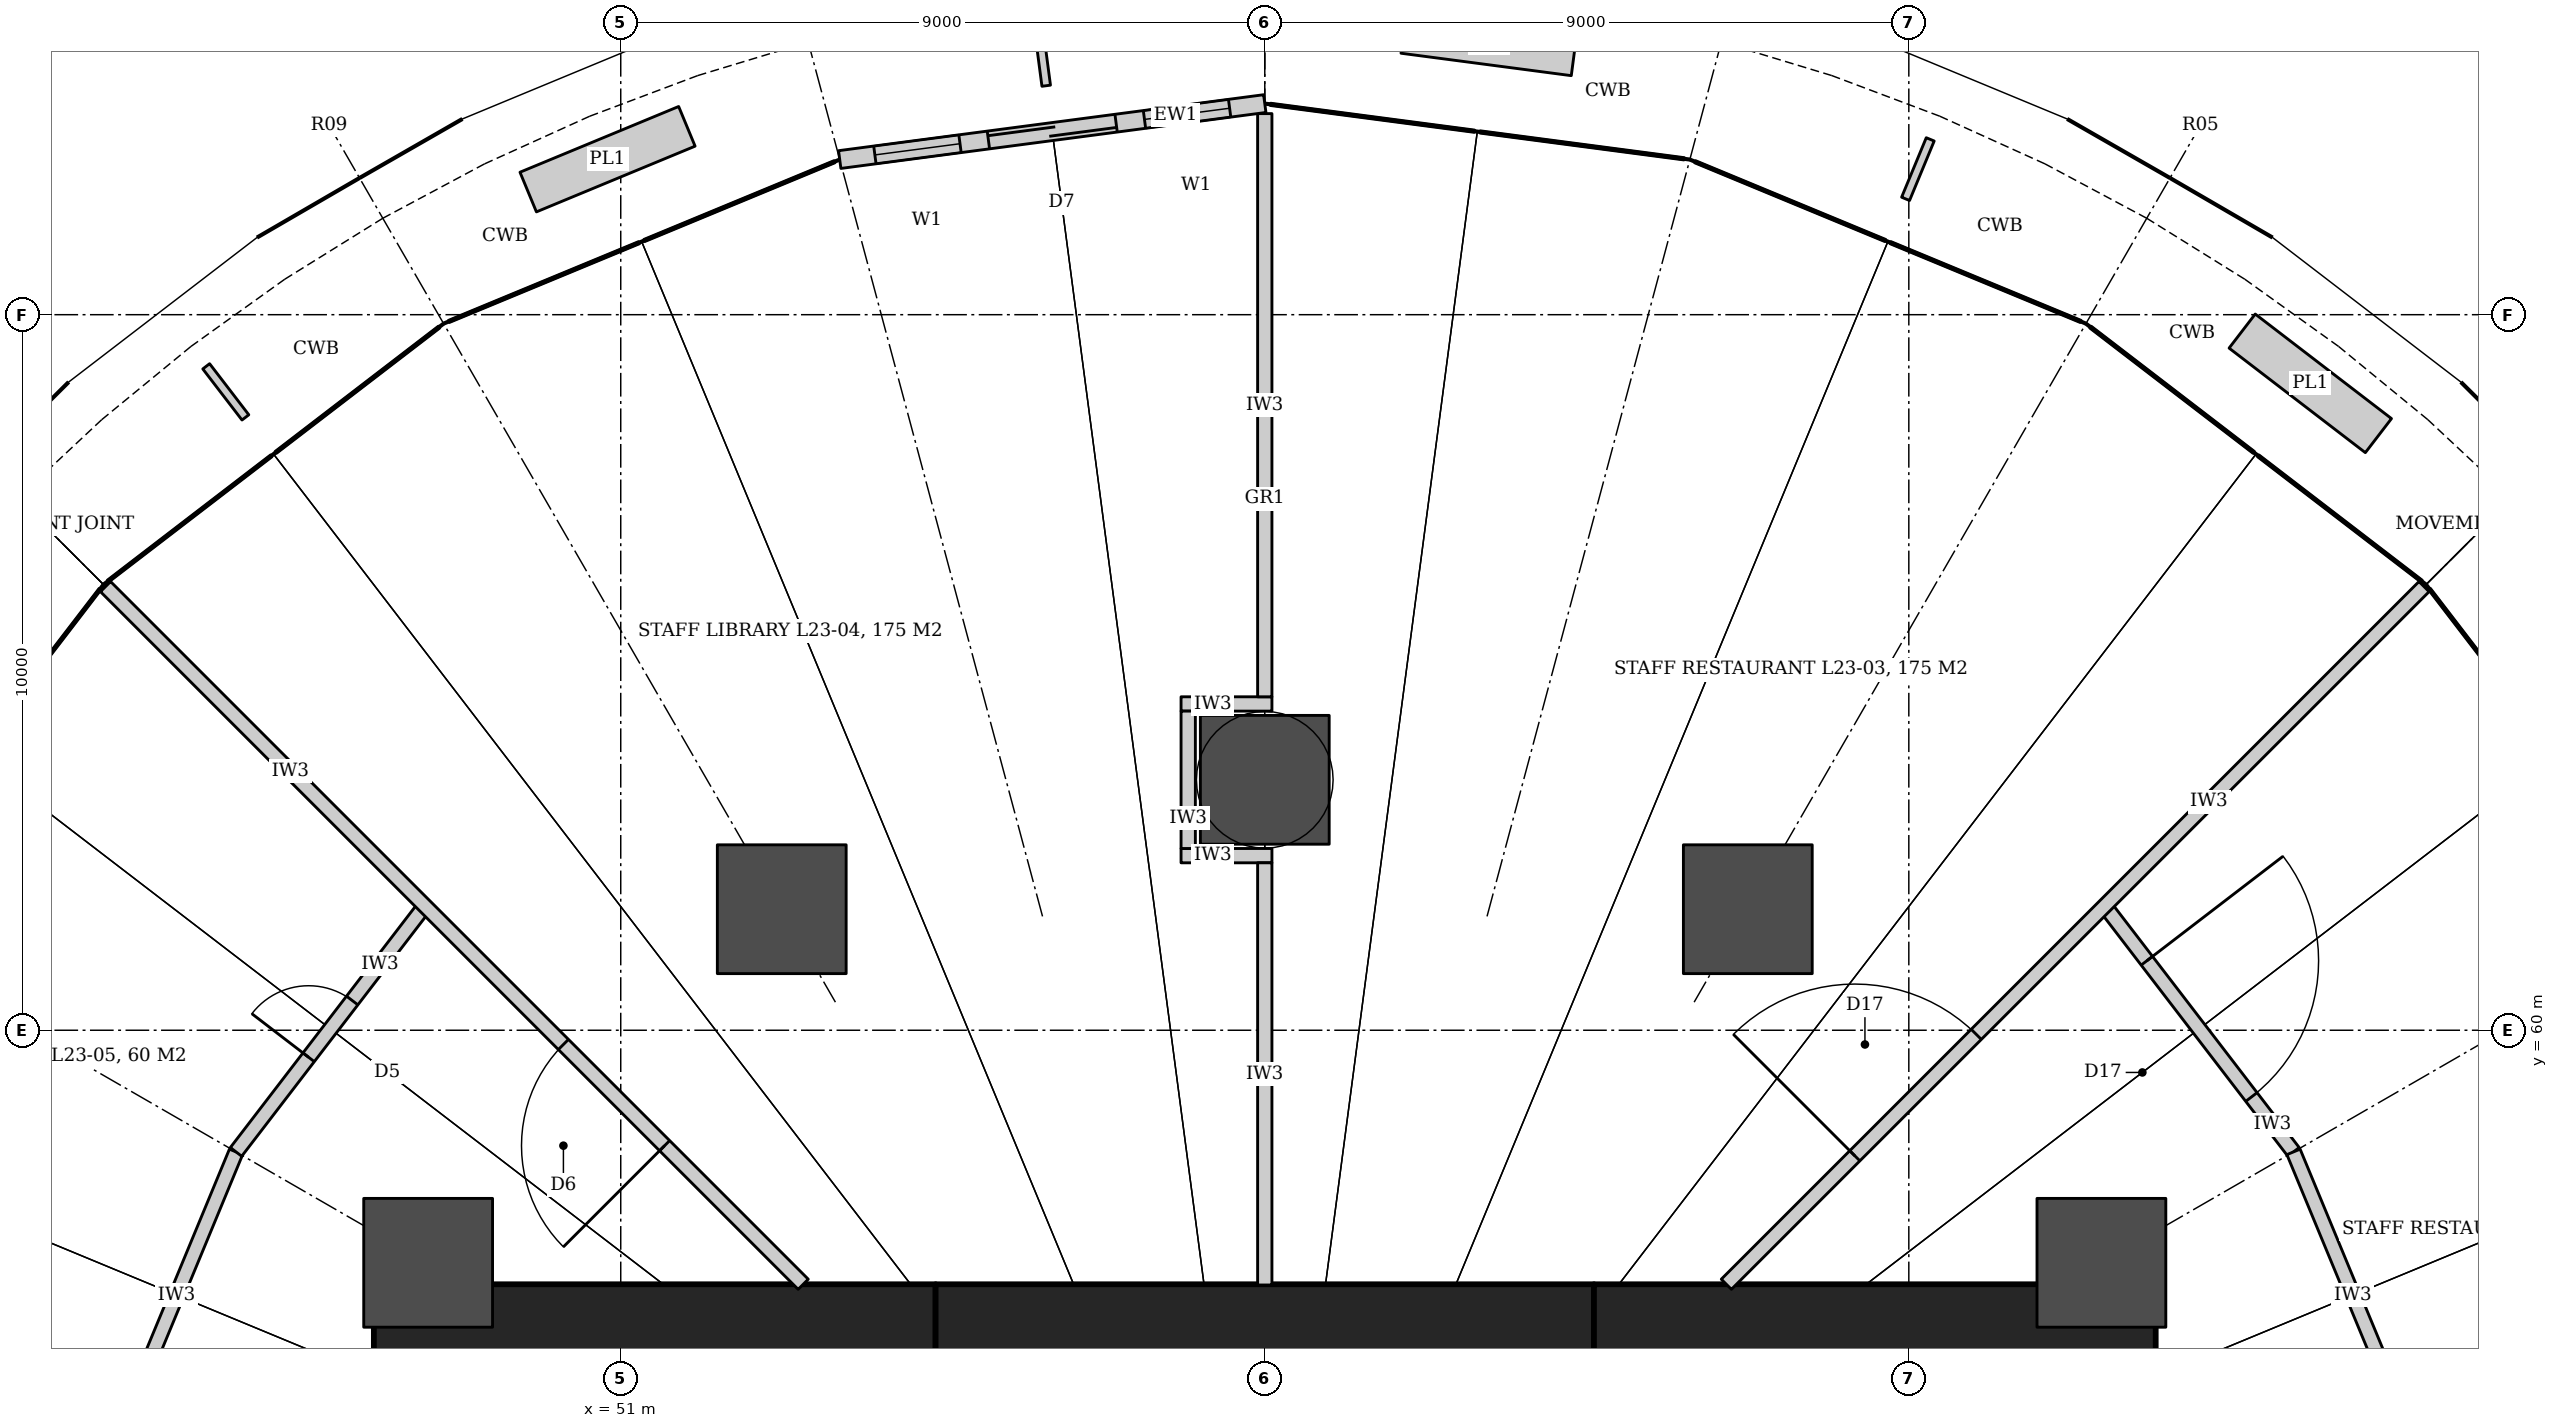
"""IFC4 building model, lengths in metres.
Left out: names, types, materials, properties, quantities, classifications, styles, units other than length and angle.
Written with IfcOpenShell. Run it as: python <this file> out.ifc"""

import sys

from ifc_helpers import new_model, si_unit, direction, frame, frame_2d, origin, origin_2d, place, context, subcontext, project, spatial, rectangle, hollow_circle, extrude, element, fill, save


model = new_model("IFC4")
c1 = context("Model", 3, precision=1e-05, world=origin(), true_north=direction((0.0, 1.0)))
c2 = subcontext(c1, "Body", "Model", "MODEL_VIEW")
j1 = project(units=[si_unit("LENGTHUNIT", "METRE"), si_unit("PLANEANGLEUNIT", "RADIAN")], contexts=[c1])
p1 = place(None, origin())
s1 = spatial("IfcSite", under=j1, at=p1, CompositionType="ELEMENT")
p2 = place(p1, origin())
s2 = spatial("IfcBuilding", under=s1, at=p2, CompositionType="ELEMENT")
p3 = place(p2, frame((0.0, 0.0, 105.8)))
s3 = spatial("IfcBuildingStorey", under=s2, at=p3, CompositionType="ELEMENT", Elevation=105.8)
p4 = place(p3, frame((47.55, 55.55, 0.0), z_axis=(0.0, 0.0, 1.0), x_axis=(1.0, 0.0, 0.0)))
e1 = element("IfcWall", 1, at=p4, inside=s3, PredefinedType="SHEAR", context=c2, shape_type="SweptSolid", body=[
    extrude(rectangle(XDim=7.85, YDim=1.8, at=frame_2d((3.925, 0.0))), origin(), (0.0, 0.0, 1.0), 4.2),
])
p5 = place(p3, frame((55.4, 55.55, 0.0), z_axis=(0.0, 0.0, 1.0), x_axis=(1.0, 0.0, 0.0)))
e2 = element("IfcWall", 2, at=p5, inside=s3, PredefinedType="SHEAR", context=c2, shape_type="SweptSolid", body=[
    extrude(rectangle(XDim=9.2, YDim=1.8, at=frame_2d((4.6, 0.0))), origin(), (0.0, 0.0, 1.0), 4.2),
])
p6 = place(p3, frame((64.6, 55.55, 0.0), z_axis=(0.0, 0.0, 1.0), x_axis=(1.0, 0.0, 0.0)))
e3 = element("IfcWall", 3, at=p6, inside=s3, PredefinedType="SHEAR", context=c2, shape_type="SweptSolid", body=[
    extrude(rectangle(XDim=7.85, YDim=1.8, at=frame_2d((3.925, 0.0))), origin(), (0.0, 0.0, 1.0), 4.2),
])
for number, where, z_axis, x_axis in (
    (4, (71.691, 56.75, 0.0), (0.0, 0.0, 1.0), (1.0, 0.0, 0.0)),
    (5, (66.75, 61.691, 0.0), (0.0, 0.0, 1.0), (1.0, 0.0, 0.0)),
    (6, (60.0, 63.5, 0.0), (0.0, 0.0, 1.0), (1.0, 0.0, 0.0)),
    (7, (53.25, 61.691, 0.0), (0.0, 0.0, 1.0), (1.0, 0.0, 0.0)),
    (8, (48.309, 56.75, 0.0), (0.0, 0.0, 1.0), (1.0, 0.0, 0.0)),
):
    element("IfcColumn", number, at=place(p3, frame(where, z_axis=z_axis, x_axis=x_axis)), inside=s3, PredefinedType="COLUMN", context=c2, shape_type="SweptSolid", body=[
        extrude(hollow_circle(Radius=0.9, WallThickness=0.09, at=origin_2d()), origin(), (0.0, 0.0, 1.0), 4.2),
    ])
p7 = place(p3, frame((43.966, 54.296, 0.0), z_axis=(0.0, 0.0, 1.0), x_axis=(0.382698425325, 0.923873322082, 0.0)))
e9 = element("IfcWall", 9, at=p7, inside=s3, PredefinedType="PARTITIONING", context=c2, shape_type="SweptSolid", body=[
    extrude(rectangle(XDim=4.333, YDim=0.2, at=frame_2d((2.167, 0.0))), origin(), (0.0, 0.0, 1.0), 3.04),
])
p8 = place(p3, frame((45.624, 58.3, 0.0), z_axis=(0.0, 0.0, 1.0), x_axis=(0.60874374674, 0.79336690806, 0.0)))
e10 = element("IfcWall", 10, at=p8, inside=s3, PredefinedType="PARTITIONING", context=c2, shape_type="SweptSolid", body=[
    extrude(rectangle(XDim=4.333, YDim=0.2, at=frame_2d((2.167, 0.0))), origin(), (0.0, 0.0, 1.0), 3.04),
])
p9 = place(p8, frame((1.667, 0.0, 0.0)))
e11 = element("IfcOpeningElement", 11, at=p9, cuts=e10, PredefinedType="OPENING", context=c2, shape_type="SweptSolid", body=[
    extrude(rectangle(XDim=1.0, YDim=2.1, at=frame_2d((0.5, 1.05))), frame((0.0, 0.11, 0.0), z_axis=(0.0, -1.0, 0.0), x_axis=(1.0, 0.0, 0.0)), (0.0, 0.0, 1.0), 0.22),
])
p10 = place(p3, frame((71.738, 61.738, 0.0), z_axis=(0.0, 0.0, 1.0), x_axis=(0.60874374674, -0.79336690806, 0.0)))
e12 = element("IfcWall", 12, at=p10, inside=s3, PredefinedType="PARTITIONING", context=c2, shape_type="SweptSolid", body=[
    extrude(rectangle(XDim=4.333, YDim=0.2, at=frame_2d((2.167, 0.0))), origin(), (0.0, 0.0, 1.0), 3.04),
])
p11 = place(p10, frame((0.967, 0.0, 0.0)))
e13 = element("IfcOpeningElement", 13, at=p11, cuts=e12, PredefinedType="OPENING", context=c2, shape_type="SweptSolid", body=[
    extrude(rectangle(XDim=2.4, YDim=2.4, at=frame_2d((1.2, 1.2))), frame((0.0, 0.11, 0.0), z_axis=(0.0, -1.0, 0.0), x_axis=(1.0, 0.0, 0.0)), (0.0, 0.0, 1.0), 0.22),
])
p12 = place(p3, frame((74.376, 58.3, 0.0), z_axis=(0.0, 0.0, 1.0), x_axis=(0.382698425325, -0.923873322082, 0.0)))
e14 = element("IfcWall", 14, at=p12, inside=s3, PredefinedType="PARTITIONING", context=c2, shape_type="SweptSolid", body=[
    extrude(rectangle(XDim=4.333, YDim=0.2, at=frame_2d((2.167, 0.0))), origin(), (0.0, 0.0, 1.0), 3.04),
])
p13 = place(p3, frame((66.45, 56.45, 0.0), z_axis=(0.0, 0.0, 1.0), x_axis=(0.707106781187, 0.707106781187, 0.0)))
e15 = element("IfcWall", 15, at=p13, inside=s3, PredefinedType="PARTITIONING", context=c2, shape_type="SweptSolid", body=[
    extrude(rectangle(XDim=13.788, YDim=0.2, at=frame_2d((6.894, 0.0))), origin(), (0.0, 0.0, 1.0), 3.02),
])
p14 = place(p13, frame((2.539, 0.0, 0.0)))
e16 = element("IfcOpeningElement", 16, at=p14, cuts=e15, PredefinedType="OPENING", context=c2, shape_type="SweptSolid", body=[
    extrude(rectangle(XDim=2.4, YDim=2.4, at=frame_2d((1.2, 1.2))), frame((0.0, 0.11, 0.0), z_axis=(0.0, -1.0, 0.0), x_axis=(1.0, 0.0, 0.0)), (0.0, 0.0, 1.0), 0.22),
])
for number, where, z_axis, x_axis in (
    (17, (60.1, 62.44, 0.0), (0.0, 0.0, 1.0), (-1.0, 0.0, 0.0)),
    (18, (60.1, 64.56, 0.0), (0.0, 0.0, 1.0), (-1.0, 0.0, 0.0)),
):
    element("IfcWall", number, at=place(p3, frame(where, z_axis=z_axis, x_axis=x_axis)), inside=s3, PredefinedType="PARTITIONING", context=c2, shape_type="SweptSolid", body=[
        extrude(rectangle(XDim=1.27, YDim=0.2, at=frame_2d((0.635, 0.0))), origin(), (0.0, 0.0, 1.0), 3.02),
    ])
p15 = place(p3, frame((58.93, 62.54, 0.0), z_axis=(0.0, 0.0, 1.0), x_axis=(0.0, 1.0, 0.0)))
e19 = element("IfcWall", 19, at=p15, inside=s3, PredefinedType="PARTITIONING", context=c2, shape_type="SweptSolid", body=[
    extrude(rectangle(XDim=1.92, YDim=0.2, at=frame_2d((0.96, 0.0))), origin(), (0.0, 0.0, 1.0), 3.02),
])
p16 = place(p3, frame((60.0, 56.44, 0.0), z_axis=(0.0, 0.0, 1.0), x_axis=(0.0, 1.0, 0.0)))
e20 = element("IfcWall", 20, at=p16, inside=s3, PredefinedType="PARTITIONING", context=c2, shape_type="SweptSolid", body=[
    extrude(rectangle(XDim=5.9, YDim=0.2, at=frame_2d((2.95, 0.0))), origin(), (0.0, 0.0, 1.0), 3.04),
])
p17 = place(p3, frame((60.0, 64.66, 0.0), z_axis=(0.0, 0.0, 1.0), x_axis=(0.0, 1.0, 0.0)))
e21 = element("IfcWall", 21, at=p17, inside=s3, PredefinedType="PARTITIONING", context=c2, shape_type="SweptSolid", body=[
    extrude(rectangle(XDim=8.15, YDim=0.2, at=frame_2d((4.075, 0.0))), origin(), (0.0, 0.0, 1.0), 3.04),
])
p18 = place(p3, frame((53.55, 56.45, 0.0), z_axis=(0.0, 0.0, 1.0), x_axis=(-0.707106781187, 0.707106781187, 0.0)))
e22 = element("IfcWall", 22, at=p18, inside=s3, PredefinedType="PARTITIONING", context=c2, shape_type="SweptSolid", body=[
    extrude(rectangle(XDim=13.788, YDim=0.2, at=frame_2d((6.894, 0.0))), origin(), (0.0, 0.0, 1.0), 3.02),
])
p19 = place(p18, frame((2.739, 0.0, 0.0)))
e23 = element("IfcOpeningElement", 23, at=p19, cuts=e22, PredefinedType="OPENING", context=c2, shape_type="SweptSolid", body=[
    extrude(rectangle(XDim=2.0, YDim=2.1, at=frame_2d((1.0, 1.05))), frame((0.0, 0.11, 0.0), z_axis=(0.0, -1.0, 0.0), x_axis=(1.0, 0.0, 0.0)), (0.0, 0.0, 1.0), 0.22),
])
p20 = place(p3, frame((43.966, 54.296, 0.0), z_axis=(0.0, 0.0, 1.0), x_axis=(-0.965929227068, 0.258806352888, 0.0)))
e24 = element("IfcWall", 24, at=p20, inside=s3, PredefinedType="PARTITIONING", context=c2, shape_type="SweptSolid", body=[
    extrude(rectangle(XDim=6.31, YDim=0.125, at=frame_2d((3.155, 0.0))), origin(), (0.0, 0.0, 1.0), 3.04),
])
p21 = place(p3, frame((60.0, 72.95, 0.0), z_axis=(0.0, 0.0, 1.0), x_axis=(-0.991445416479, -0.130521975708, 0.0)))
e25 = element("IfcWall", 25, at=p21, inside=s3, PredefinedType="SOLIDWALL", context=c2, shape_type="SweptSolid", body=[
    extrude(rectangle(XDim=5.991, YDim=0.25, at=frame_2d((2.996, 0.0))), origin(), (0.0, 0.0, 1.0), 4.04),
])
p22 = place(p21, frame((2.095, 0.0, 0.0)))
e26 = element("IfcOpeningElement", 26, at=p22, cuts=e25, PredefinedType="OPENING", context=c2, shape_type="SweptSolid", body=[
    extrude(rectangle(XDim=1.8, YDim=2.4, at=frame_2d((0.9, 1.2))), frame((0.0, 0.135, 0.0), z_axis=(0.0, -1.0, 0.0), x_axis=(1.0, 0.0, 0.0)), (0.0, 0.0, 1.0), 0.27),
])
p23 = place(p21, frame((0.496, 0.0, 0.0)))
e27 = element("IfcOpeningElement", 27, at=p23, cuts=e25, PredefinedType="OPENING", context=c2, shape_type="SweptSolid", body=[
    extrude(rectangle(XDim=1.2, YDim=2.4, at=frame_2d((0.6, 1.2))), frame((0.0, 0.135, 0.0), z_axis=(0.0, -1.0, 0.0), x_axis=(1.0, 0.0, 0.0)), (0.0, 0.0, 1.0), 0.27),
])
p24 = place(p21, frame((4.296, 0.0, 0.0)))
e28 = element("IfcOpeningElement", 28, at=p24, cuts=e25, PredefinedType="OPENING", context=c2, shape_type="SweptSolid", body=[
    extrude(rectangle(XDim=1.2, YDim=2.4, at=frame_2d((0.6, 1.2))), frame((0.0, 0.135, 0.0), z_axis=(0.0, -1.0, 0.0), x_axis=(1.0, 0.0, 0.0)), (0.0, 0.0, 1.0), 0.27),
])
p25 = place(p11, origin())
e29 = element("IfcDoor", 29, at=p25, inside=s3, OperationType="DOUBLE_DOOR_DOUBLE_SWING", PredefinedType="DOOR", context=c2, shape_type="SweptSolid", body=[
    extrude(rectangle(XDim=2.4, YDim=2.4, at=frame_2d((1.2, 1.2))), frame((0.0, 0.025, 0.0), z_axis=(0.0, -1.0, 0.0), x_axis=(1.0, 0.0, 0.0)), (0.0, 0.0, 1.0), 0.05),
])
fill(e13, e29)
p26 = place(p14, origin())
e30 = element("IfcDoor", 30, at=p26, inside=s3, OperationType="DOUBLE_DOOR_DOUBLE_SWING", PredefinedType="DOOR", context=c2, shape_type="SweptSolid", body=[
    extrude(rectangle(XDim=2.4, YDim=2.4, at=frame_2d((1.2, 1.2))), frame((0.0, 0.025, 0.0), z_axis=(0.0, -1.0, 0.0), x_axis=(1.0, 0.0, 0.0)), (0.0, 0.0, 1.0), 0.05),
])
fill(e16, e30)
p27 = place(p19, origin())
e31 = element("IfcDoor", 31, at=p27, inside=s3, OperationType="DOUBLE_DOOR_DOUBLE_SWING", PredefinedType="DOOR", context=c2, shape_type="SweptSolid", body=[
    extrude(rectangle(XDim=2.0, YDim=2.1, at=frame_2d((1.0, 1.05))), frame((0.0, 0.025, 0.0), z_axis=(0.0, -1.0, 0.0), x_axis=(1.0, 0.0, 0.0)), (0.0, 0.0, 1.0), 0.05),
])
fill(e23, e31)
p28 = place(p9, origin())
e32 = element("IfcDoor", 32, at=p28, inside=s3, OperationType="SINGLE_SWING_LEFT", PredefinedType="DOOR", context=c2, shape_type="SweptSolid", body=[
    extrude(rectangle(XDim=1.0, YDim=2.1, at=frame_2d((0.5, 1.05))), frame((0.0, 0.025, 0.0), z_axis=(0.0, -1.0, 0.0), x_axis=(1.0, 0.0, 0.0)), (0.0, 0.0, 1.0), 0.05),
])
fill(e11, e32)
p29 = place(p22, origin())
e33 = element("IfcDoor", 33, at=p29, inside=s3, OperationType="DOUBLE_DOOR_SLIDING", PredefinedType="DOOR", context=c2, shape_type="SweptSolid", body=[
    extrude(rectangle(XDim=1.8, YDim=2.4, at=frame_2d((0.9, 1.2))), frame((0.0, 0.025, 0.0), z_axis=(0.0, -1.0, 0.0), x_axis=(1.0, 0.0, 0.0)), (0.0, 0.0, 1.0), 0.05),
])
fill(e26, e33)
p30 = place(p23, origin())
e34 = element("IfcWindow", 34, at=p30, inside=s3, PartitioningType="SINGLE_PANEL", PredefinedType="WINDOW", context=c2, shape_type="SweptSolid", body=[
    extrude(rectangle(XDim=1.2, YDim=2.4, at=frame_2d((0.6, 1.2))), frame((0.0, 0.03, 0.0), z_axis=(0.0, -1.0, 0.0), x_axis=(1.0, 0.0, 0.0)), (0.0, 0.0, 1.0), 0.06),
])
fill(e27, e34)
p31 = place(p24, origin())
e35 = element("IfcWindow", 35, at=p31, inside=s3, PartitioningType="SINGLE_PANEL", PredefinedType="WINDOW", context=c2, shape_type="SweptSolid", body=[
    extrude(rectangle(XDim=1.2, YDim=2.4, at=frame_2d((0.6, 1.2))), frame((0.0, 0.03, 0.0), z_axis=(0.0, -1.0, 0.0), x_axis=(1.0, 0.0, 0.0)), (0.0, 0.0, 1.0), 0.06),
])
fill(e28, e35)
save(model, sys.argv[1])
